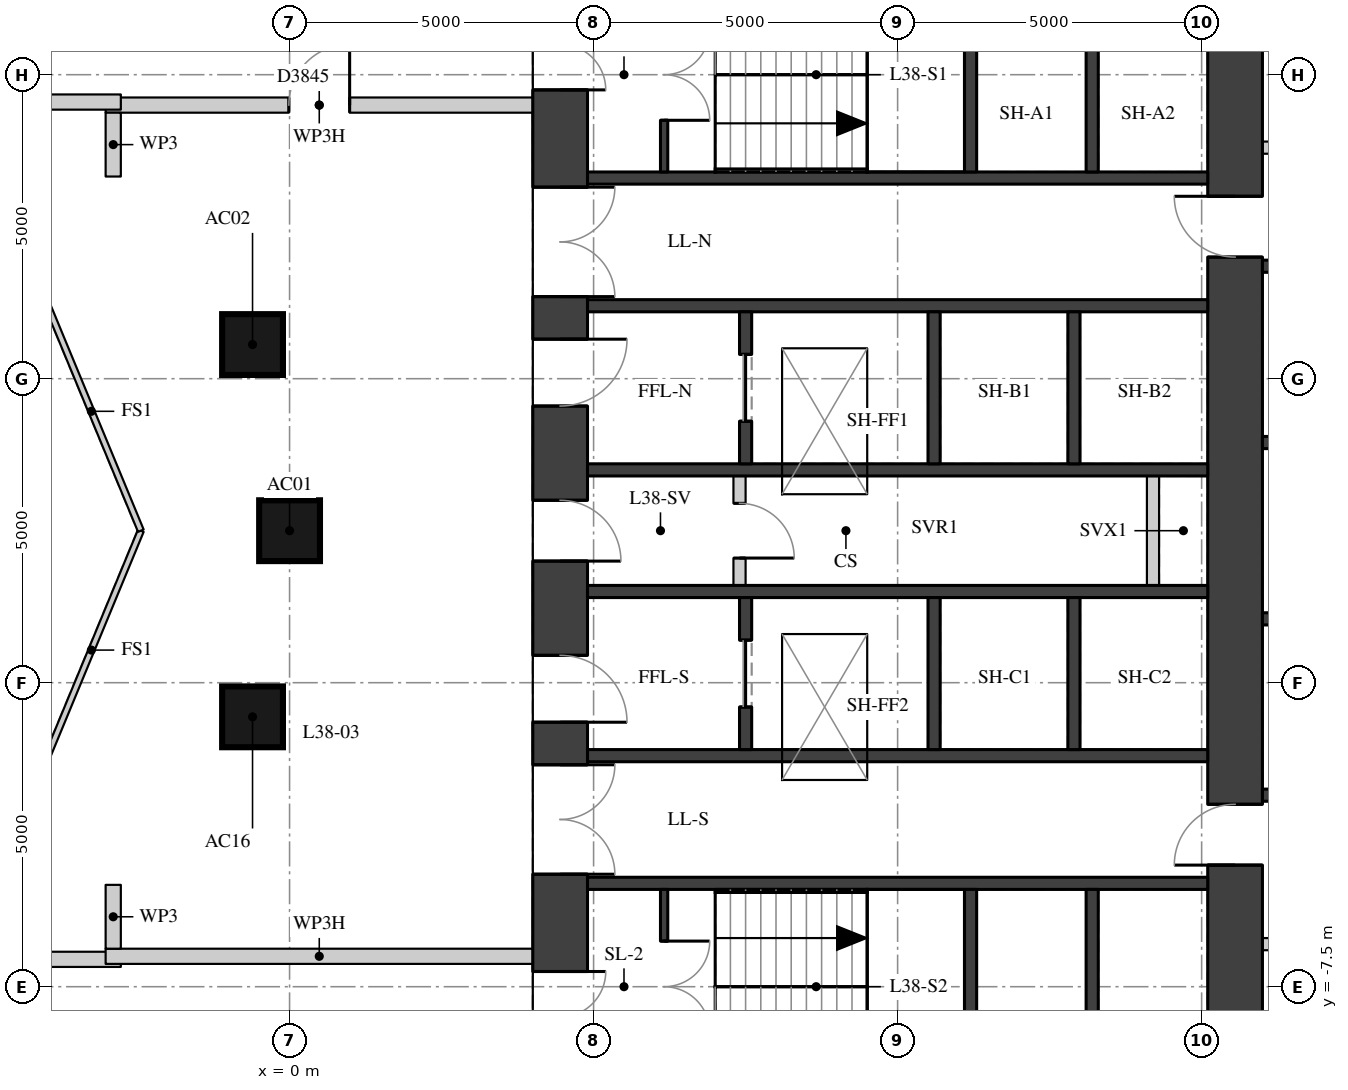
"""IFC4 building model, lengths in metres.
Left out: names, types, materials, properties, quantities, classifications, styles, units other than length and angle.
Written with IfcOpenShell. Run it as: python <this file> out.ifc"""

import sys

from ifc_helpers import new_model, si_unit, direction, frame, frame_2d, origin, origin_2d, place, context, subcontext, project, spatial, rectangle, extrude, element, fill, save


model = new_model("IFC4")
c1 = context("Model", 3, precision=1e-05, world=origin(), true_north=direction((0.0, 1.0)))
c2 = subcontext(c1, "Body", "Model", "MODEL_VIEW")
j1 = project(units=[si_unit("LENGTHUNIT", "METRE"), si_unit("PLANEANGLEUNIT", "RADIAN")], contexts=[c1])
p1 = place(None, origin())
s1 = spatial("IfcSite", under=j1, at=p1, CompositionType="ELEMENT")
p2 = place(p1, origin())
s2 = spatial("IfcBuilding", under=s1, at=p2, CompositionType="ELEMENT")
p3 = place(p2, frame((0.0, 0.0, 135.1)))
s3 = spatial("IfcBuildingStorey", under=s2, at=p3, CompositionType="ELEMENT", Elevation=135.1)
for number, where, z_axis, x_axis in (
    (1, (0.0, 0.0, 0.0), (0.0, 0.0, 1.0), (1.0, 0.0, 0.0)),
    (2, (-0.609, 3.062, 0.0), (0.0, 0.0, 1.0), (1.0, 0.0, 0.0)),
    (3, (-0.609, -3.062, 0.0), (0.0, 0.0, 1.0), (1.0, 0.0, 0.0)),
):
    element("IfcColumn", number, at=place(p3, frame(where, z_axis=z_axis, x_axis=x_axis)), inside=s3, PredefinedType="COLUMN", context=c2, shape_type="SweptSolid", body=[
        extrude(rectangle(XDim=1.0, YDim=1.0, at=origin_2d()), origin(), (0.0, 0.0, 1.0), 4.5),
    ])
p4 = place(p3, frame((4.45, -11.1, 0.0), z_axis=(0.0, 0.0, 1.0), x_axis=(0.0, 1.0, 0.0)))
e4 = element("IfcWall", 4, at=p4, inside=s3, PredefinedType="SHEAR", context=c2, shape_type="SweptSolid", body=[
    extrude(rectangle(XDim=22.2, YDim=0.9, at=frame_2d((11.1, 0.0))), origin(), (0.0, 0.0, 1.0), 4.09),
])
p5 = place(p4, frame((2.35, 0.0, 0.0)))
e5 = element("IfcOpeningElement", 5, at=p5, cuts=e4, PredefinedType="OPENING", context=c2, shape_type="SweptSolid", body=[
    extrude(rectangle(XDim=1.5, YDim=2.1, at=frame_2d((0.75, 1.05))), frame((0.0, 0.46, 0.0), z_axis=(0.0, -1.0, 0.0), x_axis=(1.0, 0.0, 0.0)), (0.0, 0.0, 1.0), 0.92),
])
p6 = place(p4, frame((5.45, 0.0, 0.0)))
e6 = element("IfcOpeningElement", 6, at=p6, cuts=e4, PredefinedType="OPENING", context=c2, shape_type="SweptSolid", body=[
    extrude(rectangle(XDim=1.8, YDim=2.1, at=frame_2d((0.9, 1.05))), frame((0.0, 0.46, 0.0), z_axis=(0.0, -1.0, 0.0), x_axis=(1.0, 0.0, 0.0)), (0.0, 0.0, 1.0), 0.92),
])
p7 = place(p4, frame((7.95, 0.0, 0.0)))
e7 = element("IfcOpeningElement", 7, at=p7, cuts=e4, PredefinedType="OPENING", context=c2, shape_type="SweptSolid", body=[
    extrude(rectangle(XDim=1.1, YDim=2.1, at=frame_2d((0.55, 1.05))), frame((0.0, 0.46, 0.0), z_axis=(0.0, -1.0, 0.0), x_axis=(1.0, 0.0, 0.0)), (0.0, 0.0, 1.0), 0.92),
])
p8 = place(p4, frame((10.6, 0.0, 0.0)))
e8 = element("IfcOpeningElement", 8, at=p8, cuts=e4, PredefinedType="OPENING", context=c2, shape_type="SweptSolid", body=[
    extrude(rectangle(XDim=1.0, YDim=2.1, at=frame_2d((0.5, 1.05))), frame((0.0, 0.46, 0.0), z_axis=(0.0, -1.0, 0.0), x_axis=(1.0, 0.0, 0.0)), (0.0, 0.0, 1.0), 0.92),
])
p9 = place(p4, frame((13.15, 0.0, 0.0)))
e9 = element("IfcOpeningElement", 9, at=p9, cuts=e4, PredefinedType="OPENING", context=c2, shape_type="SweptSolid", body=[
    extrude(rectangle(XDim=1.1, YDim=2.1, at=frame_2d((0.55, 1.05))), frame((0.0, 0.46, 0.0), z_axis=(0.0, -1.0, 0.0), x_axis=(1.0, 0.0, 0.0)), (0.0, 0.0, 1.0), 0.92),
])
p10 = place(p4, frame((14.95, 0.0, 0.0)))
e10 = element("IfcOpeningElement", 10, at=p10, cuts=e4, PredefinedType="OPENING", context=c2, shape_type="SweptSolid", body=[
    extrude(rectangle(XDim=1.8, YDim=2.1, at=frame_2d((0.9, 1.05))), frame((0.0, 0.46, 0.0), z_axis=(0.0, -1.0, 0.0), x_axis=(1.0, 0.0, 0.0)), (0.0, 0.0, 1.0), 0.92),
])
p11 = place(p4, frame((18.35, 0.0, 0.0)))
e11 = element("IfcOpeningElement", 11, at=p11, cuts=e4, PredefinedType="OPENING", context=c2, shape_type="SweptSolid", body=[
    extrude(rectangle(XDim=1.5, YDim=2.1, at=frame_2d((0.75, 1.05))), frame((0.0, 0.46, 0.0), z_axis=(0.0, -1.0, 0.0), x_axis=(1.0, 0.0, 0.0)), (0.0, 0.0, 1.0), 0.92),
])
p12 = place(p3, frame((15.55, -11.1, 0.0), z_axis=(0.0, 0.0, 1.0), x_axis=(0.0, 1.0, 0.0)))
e12 = element("IfcWall", 12, at=p12, inside=s3, PredefinedType="SHEAR", context=c2, shape_type="SweptSolid", body=[
    extrude(rectangle(XDim=22.2, YDim=0.9, at=frame_2d((11.1, 0.0))), origin(), (0.0, 0.0, 1.0), 4.09),
])
p13 = place(p12, frame((15.6, 0.0, 0.0)))
e13 = element("IfcOpeningElement", 13, at=p13, cuts=e12, PredefinedType="OPENING", context=c2, shape_type="SweptSolid", body=[
    extrude(rectangle(XDim=1.0, YDim=2.1, at=frame_2d((0.5, 1.05))), frame((0.0, 0.46, 0.0), z_axis=(0.0, -1.0, 0.0), x_axis=(1.0, 0.0, 0.0)), (0.0, 0.0, 1.0), 0.92),
])
p14 = place(p12, frame((5.6, 0.0, 0.0)))
e14 = element("IfcOpeningElement", 14, at=p14, cuts=e12, PredefinedType="OPENING", context=c2, shape_type="SweptSolid", body=[
    extrude(rectangle(XDim=1.0, YDim=2.1, at=frame_2d((0.5, 1.05))), frame((0.0, 0.46, 0.0), z_axis=(0.0, -1.0, 0.0), x_axis=(1.0, 0.0, 0.0)), (0.0, 0.0, 1.0), 0.92),
])
for number, where, z_axis, x_axis in (
    (15, (4.9, 5.8, 0.0), (0.0, 0.0, 1.0), (1.0, 0.0, 0.0)),
    (16, (4.9, 3.7, 0.0), (0.0, 0.0, 1.0), (1.0, 0.0, 0.0)),
    (17, (4.9, 1.0, 0.0), (0.0, 0.0, 1.0), (1.0, 0.0, 0.0)),
    (18, (4.9, -1.0, 0.0), (0.0, 0.0, 1.0), (1.0, 0.0, 0.0)),
    (19, (4.9, -3.7, 0.0), (0.0, 0.0, 1.0), (1.0, 0.0, 0.0)),
    (20, (4.9, -5.8, 0.0), (0.0, 0.0, 1.0), (1.0, 0.0, 0.0)),
):
    element("IfcWall", number, at=place(p3, frame(where, z_axis=z_axis, x_axis=x_axis)), inside=s3, PredefinedType="SHEAR", context=c2, shape_type="SweptSolid", body=[
        extrude(rectangle(XDim=10.2, YDim=0.2, at=frame_2d((5.1, 0.0))), origin(), (0.0, 0.0, 1.0), 4.09),
    ])
for number, where, z_axis, x_axis in (
    (21, (11.2, 5.9, 0.0), (0.0, 0.0, 1.0), (0.0, 1.0, 0.0)),
    (22, (11.2, -9.1, 0.0), (0.0, 0.0, 1.0), (0.0, 1.0, 0.0)),
    (23, (13.2, 5.9, 0.0), (0.0, 0.0, 1.0), (0.0, 1.0, 0.0)),
    (24, (13.2, -9.1, 0.0), (0.0, 0.0, 1.0), (0.0, 1.0, 0.0)),
):
    element("IfcWall", number, at=place(p3, frame(where, z_axis=z_axis, x_axis=x_axis)), inside=s3, PredefinedType="SHEAR", context=c2, shape_type="SweptSolid", body=[
        extrude(rectangle(XDim=3.2, YDim=0.2, at=frame_2d((1.6, 0.0))), origin(), (0.0, 0.0, 1.0), 4.09),
    ])
p15 = place(p3, frame((7.5, 1.1, 0.0), z_axis=(0.0, 0.0, 1.0), x_axis=(0.0, 1.0, 0.0)))
e25 = element("IfcWall", 25, at=p15, inside=s3, PredefinedType="SHEAR", context=c2, shape_type="SweptSolid", body=[
    extrude(rectangle(XDim=2.5, YDim=0.2, at=frame_2d((1.25, 0.0))), origin(), (0.0, 0.0, 1.0), 4.09),
])
p16 = place(p15, frame((0.7, 0.0, 0.0)))
e26 = element("IfcOpeningElement", 26, at=p16, cuts=e25, PredefinedType="OPENING", context=c2, shape_type="SweptSolid", body=[
    extrude(rectangle(XDim=1.1, YDim=2.1, at=frame_2d((0.55, 1.05))), frame((0.0, 0.11, 0.0), z_axis=(0.0, -1.0, 0.0), x_axis=(1.0, 0.0, 0.0)), (0.0, 0.0, 1.0), 0.22),
])
p17 = place(p3, frame((7.5, -3.6, 0.0), z_axis=(0.0, 0.0, 1.0), x_axis=(0.0, 1.0, 0.0)))
e27 = element("IfcWall", 27, at=p17, inside=s3, PredefinedType="SHEAR", context=c2, shape_type="SweptSolid", body=[
    extrude(rectangle(XDim=2.5, YDim=0.2, at=frame_2d((1.25, 0.0))), origin(), (0.0, 0.0, 1.0), 4.09),
])
p18 = place(p17, frame((0.7, 0.0, 0.0)))
e28 = element("IfcOpeningElement", 28, at=p18, cuts=e27, PredefinedType="OPENING", context=c2, shape_type="SweptSolid", body=[
    extrude(rectangle(XDim=1.1, YDim=2.1, at=frame_2d((0.55, 1.05))), frame((0.0, 0.11, 0.0), z_axis=(0.0, -1.0, 0.0), x_axis=(1.0, 0.0, 0.0)), (0.0, 0.0, 1.0), 0.22),
])
for number, where, z_axis, x_axis in (
    (29, (10.6, 1.1, 0.0), (0.0, 0.0, 1.0), (0.0, 1.0, 0.0)),
    (30, (10.6, -3.6, 0.0), (0.0, 0.0, 1.0), (0.0, 1.0, 0.0)),
    (31, (12.9, 1.1, 0.0), (0.0, 0.0, 1.0), (0.0, 1.0, 0.0)),
    (32, (12.9, -3.6, 0.0), (0.0, 0.0, 1.0), (0.0, 1.0, 0.0)),
):
    element("IfcWall", number, at=place(p3, frame(where, z_axis=z_axis, x_axis=x_axis)), inside=s3, PredefinedType="SHEAR", context=c2, shape_type="SweptSolid", body=[
        extrude(rectangle(XDim=2.5, YDim=0.2, at=frame_2d((1.25, 0.0))), origin(), (0.0, 0.0, 1.0), 4.09),
    ])
p19 = place(p3, frame((6.16, 5.9, 0.0), z_axis=(0.0, 0.0, 1.0), x_axis=(0.0, 1.0, 0.0)))
e33 = element("IfcWall", 33, at=p19, inside=s3, PredefinedType="SHEAR", context=c2, shape_type="SweptSolid", body=[
    extrude(rectangle(XDim=3.2, YDim=0.12, at=frame_2d((1.6, 0.0))), origin(), (0.0, 0.0, 1.0), 4.09),
])
p20 = place(p19, frame((0.85, 0.0, 0.0)))
e34 = element("IfcOpeningElement", 34, at=p20, cuts=e33, PredefinedType="OPENING", context=c2, shape_type="SweptSolid", body=[
    extrude(rectangle(XDim=1.5, YDim=2.1, at=frame_2d((0.75, 1.05))), frame((0.0, 0.07, 0.0), z_axis=(0.0, -1.0, 0.0), x_axis=(1.0, 0.0, 0.0)), (0.0, 0.0, 1.0), 0.14),
])
p21 = place(p3, frame((6.16, -9.1, 0.0), z_axis=(0.0, 0.0, 1.0), x_axis=(0.0, 1.0, 0.0)))
e35 = element("IfcWall", 35, at=p21, inside=s3, PredefinedType="SHEAR", context=c2, shape_type="SweptSolid", body=[
    extrude(rectangle(XDim=3.2, YDim=0.12, at=frame_2d((1.6, 0.0))), origin(), (0.0, 0.0, 1.0), 4.09),
])
p22 = place(p21, frame((0.85, 0.0, 0.0)))
e36 = element("IfcOpeningElement", 36, at=p22, cuts=e35, PredefinedType="OPENING", context=c2, shape_type="SweptSolid", body=[
    extrude(rectangle(XDim=1.5, YDim=2.1, at=frame_2d((0.75, 1.05))), frame((0.0, 0.07, 0.0), z_axis=(0.0, -1.0, 0.0), x_axis=(1.0, 0.0, 0.0)), (0.0, 0.0, 1.0), 0.14),
])
p23 = place(p3, frame((7.4, -0.9, 0.0), z_axis=(0.0, 0.0, 1.0), x_axis=(0.0, 1.0, 0.0)))
e37 = element("IfcWall", 37, at=p23, inside=s3, PredefinedType="PARTITIONING", context=c2, shape_type="SweptSolid", body=[
    extrude(rectangle(XDim=1.8, YDim=0.2, at=frame_2d((0.9, 0.0))), origin(), (0.0, 0.0, 1.0), 4.09),
])
p24 = place(p23, frame((0.45, 0.0, 0.0)))
e38 = element("IfcOpeningElement", 38, at=p24, cuts=e37, PredefinedType="OPENING", context=c2, shape_type="SweptSolid", body=[
    extrude(rectangle(XDim=0.9, YDim=2.1, at=frame_2d((0.45, 1.05))), frame((0.0, 0.11, 0.0), z_axis=(0.0, -1.0, 0.0), x_axis=(1.0, 0.0, 0.0)), (0.0, 0.0, 1.0), 0.22),
])
p25 = place(p3, frame((14.2, -0.9, 0.0), z_axis=(0.0, 0.0, 1.0), x_axis=(0.0, 1.0, 0.0)))
e39 = element("IfcWall", 39, at=p25, inside=s3, PredefinedType="PARTITIONING", context=c2, shape_type="SweptSolid", body=[
    extrude(rectangle(XDim=1.8, YDim=0.2, at=frame_2d((0.9, 0.0))), origin(), (0.0, 0.0, 1.0), 4.09),
])
for number, where, z_axis, x_axis in (
    (40, (16.0, -4.35, 0.0), (0.0, 0.0, 1.0), (1.0, 0.0, 0.0)),
    (41, (16.0, -1.45, 0.0), (0.0, 0.0, 1.0), (1.0, 0.0, 0.0)),
    (42, (16.0, 1.45, 0.0), (0.0, 0.0, 1.0), (1.0, 0.0, 0.0)),
    (43, (16.0, 4.35, 0.0), (0.0, 0.0, 1.0), (1.0, 0.0, 0.0)),
):
    element("IfcWall", number, at=place(p3, frame(where, z_axis=z_axis, x_axis=x_axis)), inside=s3, PredefinedType="SHEAR", context=c2, shape_type="SweptSolid", body=[
        extrude(rectangle(XDim=2.3, YDim=0.2, at=frame_2d((1.15, 0.0))), origin(), (0.0, 0.0, 1.0), 4.09),
    ])
p26 = place(p3, frame((16.0, 6.3, 0.0), z_axis=(0.0, 0.0, 1.0), x_axis=(1.0, 0.0, 0.0)))
e44 = element("IfcWall", 44, at=p26, inside=s3, PredefinedType="PARTITIONING", context=c2, shape_type="SweptSolid", body=[
    extrude(rectangle(XDim=2.3, YDim=0.2, at=frame_2d((1.15, 0.0))), origin(), (0.0, 0.0, 1.0), 4.09),
])
p27 = place(p26, frame((0.3, 0.0, 0.0)))
e45 = element("IfcOpeningElement", 45, at=p27, cuts=e44, PredefinedType="OPENING", context=c2, shape_type="SweptSolid", body=[
    extrude(rectangle(XDim=0.9, YDim=2.1, at=frame_2d((0.45, 1.05))), frame((0.0, 0.11, 0.0), z_axis=(0.0, -1.0, 0.0), x_axis=(1.0, 0.0, 0.0)), (0.0, 0.0, 1.0), 0.22),
])
p28 = place(p3, frame((16.0, -6.8, 0.0), z_axis=(0.0, 0.0, 1.0), x_axis=(1.0, 0.0, 0.0)))
e46 = element("IfcWall", 46, at=p28, inside=s3, PredefinedType="PARTITIONING", context=c2, shape_type="SweptSolid", body=[
    extrude(rectangle(XDim=2.3, YDim=0.2, at=frame_2d((1.15, 0.0))), origin(), (0.0, 0.0, 1.0), 4.09),
])
p29 = place(p28, frame((0.2, 0.0, 0.0)))
e47 = element("IfcOpeningElement", 47, at=p29, cuts=e46, PredefinedType="OPENING", context=c2, shape_type="SweptSolid", body=[
    extrude(rectangle(XDim=0.9, YDim=2.1, at=frame_2d((0.45, 1.05))), frame((0.0, 0.11, 0.0), z_axis=(0.0, -1.0, 0.0), x_axis=(1.0, 0.0, 0.0)), (0.0, 0.0, 1.0), 0.22),
])
p30 = place(p3, frame((-9.375, -7.05, 0.0), z_axis=(0.0, 0.0, 1.0), x_axis=(1.0, 0.0, 0.0)))
e48 = element("IfcWall", 48, at=p30, inside=s3, PredefinedType="PARTITIONING", context=c2, shape_type="SweptSolid", body=[
    extrude(rectangle(XDim=6.6, YDim=0.25, at=frame_2d((3.3, 0.0))), origin(), (0.0, 0.0, 1.0), 3.54),
])
p31 = place(p3, frame((-3.025, -7.0, 0.0), z_axis=(0.0, 0.0, 1.0), x_axis=(1.0, 0.0, 0.0)))
e49 = element("IfcWall", 49, at=p31, inside=s3, PredefinedType="PARTITIONING", context=c2, shape_type="SweptSolid", body=[
    extrude(rectangle(XDim=7.027, YDim=0.25, at=frame_2d((3.513, 0.0))), origin(), (0.0, 0.0, 1.0), 3.54),
])
p32 = place(p3, frame((-3.025, 7.0, 0.0), z_axis=(0.0, 0.0, 1.0), x_axis=(1.0, 0.0, 0.0)))
e50 = element("IfcWall", 50, at=p32, inside=s3, PredefinedType="PARTITIONING", context=c2, shape_type="SweptSolid", body=[
    extrude(rectangle(XDim=7.027, YDim=0.25, at=frame_2d((3.513, 0.0))), origin(), (0.0, 0.0, 1.0), 3.54),
])
p33 = place(p32, frame((3.013, 0.0, 0.0)))
e51 = element("IfcOpeningElement", 51, at=p33, cuts=e50, PredefinedType="OPENING", context=c2, shape_type="SweptSolid", body=[
    extrude(rectangle(XDim=1.0, YDim=2.1, at=frame_2d((0.5, 1.05))), frame((0.0, 0.135, 0.0), z_axis=(0.0, -1.0, 0.0), x_axis=(1.0, 0.0, 0.0)), (0.0, 0.0, 1.0), 0.27),
])
p34 = place(p3, frame((-9.375, 7.05, 0.0), z_axis=(0.0, 0.0, 1.0), x_axis=(1.0, 0.0, 0.0)))
e52 = element("IfcWall", 52, at=p34, inside=s3, PredefinedType="PARTITIONING", context=c2, shape_type="SweptSolid", body=[
    extrude(rectangle(XDim=6.6, YDim=0.25, at=frame_2d((3.3, 0.0))), origin(), (0.0, 0.0, 1.0), 3.54),
])
for number, where, z_axis, x_axis in (
    (53, (-2.9, -6.875, 0.0), (0.0, 0.0, 1.0), (0.0, 1.0, 0.0)),
    (54, (-2.9, 5.825, 0.0), (0.0, 0.0, 1.0), (0.0, 1.0, 0.0)),
):
    element("IfcWall", number, at=place(p3, frame(where, z_axis=z_axis, x_axis=x_axis)), inside=s3, PredefinedType="PARTITIONING", context=c2, shape_type="SweptSolid", body=[
        extrude(rectangle(XDim=1.05, YDim=0.25, at=frame_2d((0.525, 0.0))), origin(), (0.0, 0.0, 1.0), 4.09),
    ])
for number, where, z_axis, x_axis in (
    (55, (-2.446, 0.0, 0.0), (0.0, 0.0, 1.0), (-0.383, -0.924, 0.0)),
    (56, (-4.073, 3.927, 0.0), (0.0, 0.0, 1.0), (0.383, -0.924, 0.0)),
):
    element("IfcWall", number, at=place(p3, frame(where, z_axis=z_axis, x_axis=x_axis)), inside=s3, PredefinedType="PARTITIONING", context=c2, shape_type="SweptSolid", body=[
        extrude(rectangle(XDim=4.251, YDim=0.1, at=frame_2d((2.125, 0.0))), origin(), (0.0, 0.0, 1.0), 4.09),
    ])
p35 = place(p5, origin())
e57 = element("IfcDoor", 57, at=p35, inside=s3, OperationType="DOUBLE_DOOR_SINGLE_SWING", PredefinedType="DOOR", context=c2, shape_type="SweptSolid", body=[
    extrude(rectangle(XDim=1.5, YDim=2.1, at=frame_2d((0.75, 1.05))), frame((0.0, 0.025, 0.0), z_axis=(0.0, -1.0, 0.0), x_axis=(1.0, 0.0, 0.0)), (0.0, 0.0, 1.0), 0.05),
])
fill(e5, e57)
p36 = place(p6, origin())
e58 = element("IfcDoor", 58, at=p36, inside=s3, OperationType="DOUBLE_DOOR_SINGLE_SWING", PredefinedType="DOOR", context=c2, shape_type="SweptSolid", body=[
    extrude(rectangle(XDim=1.8, YDim=2.1, at=frame_2d((0.9, 1.05))), frame((0.0, 0.025, 0.0), z_axis=(0.0, -1.0, 0.0), x_axis=(1.0, 0.0, 0.0)), (0.0, 0.0, 1.0), 0.05),
])
fill(e6, e58)
p37 = place(p7, origin())
e59 = element("IfcDoor", 59, at=p37, inside=s3, OperationType="SINGLE_SWING_RIGHT", PredefinedType="DOOR", context=c2, shape_type="SweptSolid", body=[
    extrude(rectangle(XDim=1.1, YDim=2.1, at=frame_2d((0.55, 1.05))), frame((0.0, 0.025, 0.0), z_axis=(0.0, -1.0, 0.0), x_axis=(1.0, 0.0, 0.0)), (0.0, 0.0, 1.0), 0.05),
])
fill(e7, e59)
p38 = place(p8, origin())
e60 = element("IfcDoor", 60, at=p38, inside=s3, OperationType="SINGLE_SWING_RIGHT", PredefinedType="DOOR", context=c2, shape_type="SweptSolid", body=[
    extrude(rectangle(XDim=1.0, YDim=2.1, at=frame_2d((0.5, 1.05))), frame((0.0, 0.025, 0.0), z_axis=(0.0, -1.0, 0.0), x_axis=(1.0, 0.0, 0.0)), (0.0, 0.0, 1.0), 0.05),
])
fill(e8, e60)
p39 = place(p9, origin())
e61 = element("IfcDoor", 61, at=p39, inside=s3, OperationType="SINGLE_SWING_LEFT", PredefinedType="DOOR", context=c2, shape_type="SweptSolid", body=[
    extrude(rectangle(XDim=1.1, YDim=2.1, at=frame_2d((0.55, 1.05))), frame((0.0, 0.025, 0.0), z_axis=(0.0, -1.0, 0.0), x_axis=(1.0, 0.0, 0.0)), (0.0, 0.0, 1.0), 0.05),
])
fill(e9, e61)
p40 = place(p10, origin())
e62 = element("IfcDoor", 62, at=p40, inside=s3, OperationType="DOUBLE_DOOR_SINGLE_SWING", PredefinedType="DOOR", context=c2, shape_type="SweptSolid", body=[
    extrude(rectangle(XDim=1.8, YDim=2.1, at=frame_2d((0.9, 1.05))), frame((0.0, 0.025, 0.0), z_axis=(0.0, -1.0, 0.0), x_axis=(1.0, 0.0, 0.0)), (0.0, 0.0, 1.0), 0.05),
])
fill(e10, e62)
p41 = place(p11, origin())
e63 = element("IfcDoor", 63, at=p41, inside=s3, OperationType="DOUBLE_DOOR_SINGLE_SWING", PredefinedType="DOOR", context=c2, shape_type="SweptSolid", body=[
    extrude(rectangle(XDim=1.5, YDim=2.1, at=frame_2d((0.75, 1.05))), frame((0.0, 0.025, 0.0), z_axis=(0.0, -1.0, 0.0), x_axis=(1.0, 0.0, 0.0)), (0.0, 0.0, 1.0), 0.05),
])
fill(e11, e63)
p42 = place(p20, origin())
e64 = element("IfcDoor", 64, at=p42, inside=s3, OperationType="DOUBLE_DOOR_SINGLE_SWING", PredefinedType="DOOR", context=c2, shape_type="SweptSolid", body=[
    extrude(rectangle(XDim=1.5, YDim=2.1, at=frame_2d((0.75, 1.05))), frame((0.0, 0.025, 0.0), z_axis=(0.0, -1.0, 0.0), x_axis=(1.0, 0.0, 0.0)), (0.0, 0.0, 1.0), 0.05),
])
fill(e34, e64)
p43 = place(p22, origin())
e65 = element("IfcDoor", 65, at=p43, inside=s3, OperationType="DOUBLE_DOOR_SINGLE_SWING", PredefinedType="DOOR", context=c2, shape_type="SweptSolid", body=[
    extrude(rectangle(XDim=1.5, YDim=2.1, at=frame_2d((0.75, 1.05))), frame((0.0, 0.025, 0.0), z_axis=(0.0, -1.0, 0.0), x_axis=(1.0, 0.0, 0.0)), (0.0, 0.0, 1.0), 0.05),
])
fill(e36, e65)
p44 = place(p16, origin())
e66 = element("IfcDoor", 66, at=p44, inside=s3, OperationType="DOUBLE_DOOR_SLIDING", PredefinedType="DOOR", context=c2, shape_type="SweptSolid", body=[
    extrude(rectangle(XDim=1.1, YDim=2.1, at=frame_2d((0.55, 1.05))), frame((0.0, 0.025, 0.0), z_axis=(0.0, -1.0, 0.0), x_axis=(1.0, 0.0, 0.0)), (0.0, 0.0, 1.0), 0.05),
])
fill(e26, e66)
p45 = place(p18, origin())
e67 = element("IfcDoor", 67, at=p45, inside=s3, OperationType="DOUBLE_DOOR_SLIDING", PredefinedType="DOOR", context=c2, shape_type="SweptSolid", body=[
    extrude(rectangle(XDim=1.1, YDim=2.1, at=frame_2d((0.55, 1.05))), frame((0.0, 0.025, 0.0), z_axis=(0.0, -1.0, 0.0), x_axis=(1.0, 0.0, 0.0)), (0.0, 0.0, 1.0), 0.05),
])
fill(e28, e67)
p46 = place(p24, origin())
e68 = element("IfcDoor", 68, at=p46, inside=s3, OperationType="SINGLE_SWING_RIGHT", PredefinedType="DOOR", context=c2, shape_type="SweptSolid", body=[
    extrude(rectangle(XDim=0.9, YDim=2.1, at=frame_2d((0.45, 1.05))), frame((0.0, 0.025, 0.0), z_axis=(0.0, -1.0, 0.0), x_axis=(1.0, 0.0, 0.0)), (0.0, 0.0, 1.0), 0.05),
])
fill(e38, e68)
p47 = place(p13, origin())
e69 = element("IfcDoor", 69, at=p47, inside=s3, OperationType="SINGLE_SWING_RIGHT", PredefinedType="DOOR", context=c2, shape_type="SweptSolid", body=[
    extrude(rectangle(XDim=1.0, YDim=2.1, at=frame_2d((0.5, 1.05))), frame((0.0, 0.025, 0.0), z_axis=(0.0, -1.0, 0.0), x_axis=(1.0, 0.0, 0.0)), (0.0, 0.0, 1.0), 0.05),
])
fill(e13, e69)
p48 = place(p14, origin())
e70 = element("IfcDoor", 70, at=p48, inside=s3, OperationType="SINGLE_SWING_LEFT", PredefinedType="DOOR", context=c2, shape_type="SweptSolid", body=[
    extrude(rectangle(XDim=1.0, YDim=2.1, at=frame_2d((0.5, 1.05))), frame((0.0, 0.025, 0.0), z_axis=(0.0, -1.0, 0.0), x_axis=(1.0, 0.0, 0.0)), (0.0, 0.0, 1.0), 0.05),
])
fill(e14, e70)
p49 = place(p33, origin())
e71 = element("IfcDoor", 71, at=p49, inside=s3, OperationType="SINGLE_SWING_RIGHT", PredefinedType="DOOR", context=c2, shape_type="SweptSolid", body=[
    extrude(rectangle(XDim=1.0, YDim=2.1, at=frame_2d((0.5, 1.05))), frame((0.0, 0.025, 0.0), z_axis=(0.0, -1.0, 0.0), x_axis=(1.0, 0.0, 0.0)), (0.0, 0.0, 1.0), 0.05),
])
fill(e51, e71)
save(model, sys.argv[1])
